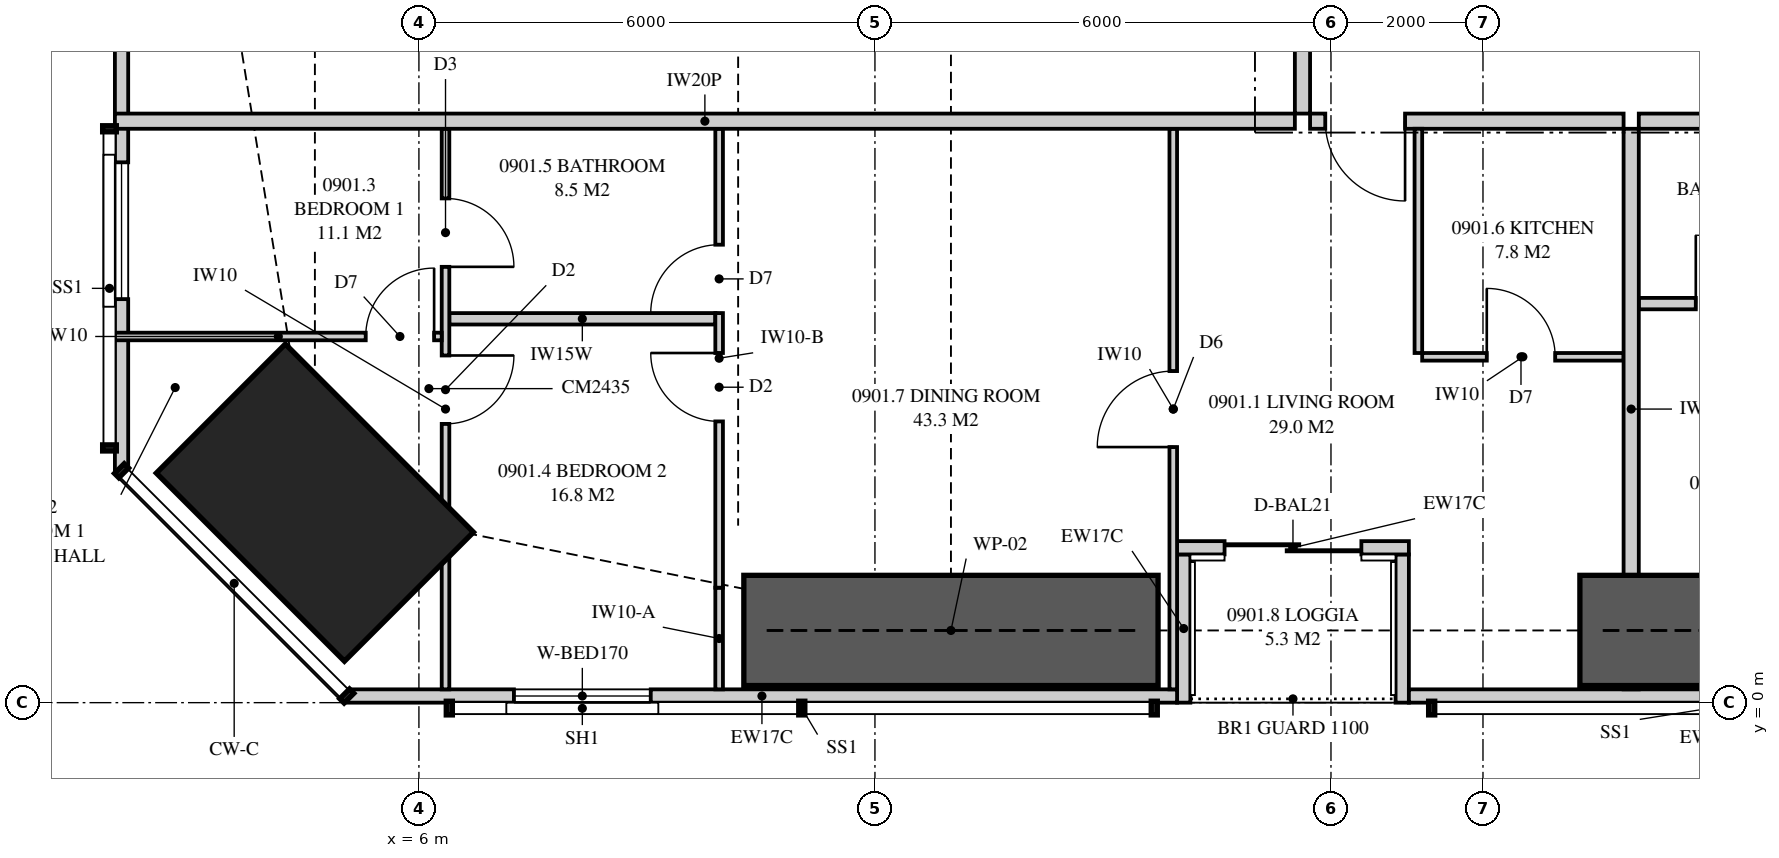
"""IFC4 building model, lengths in metres.
Left out: names, types, materials, properties, quantities, classifications, styles, units other than length and angle.
Written with IfcOpenShell. Run it as: python <this file> out.ifc"""

import sys

from ifc_helpers import new_model, si_unit, direction, frame, frame_2d, origin, origin_2d, place, context, subcontext, project, spatial, polyline, rectangle, outline, extrude, element, fill, save


model = new_model("IFC4")
c1 = context("Model", 3, precision=1e-05, world=origin(), true_north=direction((0.0, 1.0)))
c2 = subcontext(c1, "Body", "Model", "MODEL_VIEW")
j1 = project(units=[si_unit("LENGTHUNIT", "METRE"), si_unit("PLANEANGLEUNIT", "RADIAN")], contexts=[c1])
p1 = place(None, origin())
s1 = spatial("IfcSite", under=j1, at=p1, CompositionType="ELEMENT")
p2 = place(p1, origin())
s2 = spatial("IfcBuilding", under=s1, at=p2, CompositionType="ELEMENT")
p3 = place(p2, frame((0.0, 0.0, 37.75)))
s3 = spatial("IfcBuildingStorey", under=s2, at=p3, CompositionType="ELEMENT", Elevation=37.75)
p4 = place(p3, frame((4.631, 2.631, 0.0), z_axis=(0.0, 0.0, 1.0), x_axis=(0.707106781187, 0.707106781187, 0.0)))
e1 = element("IfcColumn", 1, at=p4, inside=s3, PredefinedType="COLUMN", context=c2, shape_type="SweptSolid", body=[
    extrude(rectangle(XDim=2.4, YDim=3.5, at=origin_2d()), origin(), (0.0, 0.0, 1.0), 3.35),
])
p5 = place(p3, frame((5.051, 0.087, 0.0), z_axis=(0.0, 0.0, 1.0), x_axis=(1.0, 0.0, 0.0)))
e2 = element("IfcWall", 2, at=p5, inside=s3, PredefinedType="SOLIDWALL", context=c2, shape_type="SweptSolid", body=[
    extrude(outline(polyline([(0.0, 0.0), (10.924, 0.0), (10.924, 2.15), (7.949, 2.15), (7.949, 3.11), (7.793, 3.11), (7.793, 2.15), (7.745, 2.15), (7.745, 3.11), (0.0, 3.11), (0.0, 0.0)])), frame((0.0, 0.087, 0.0), z_axis=(0.0, -1.0, 0.0), x_axis=(1.0, 0.0, 0.0)), (0.0, 0.0, 1.0), 0.175),
])
p6 = place(p5, frame((2.199, 0.0, 0.4)))
e3 = element("IfcOpeningElement", 3, at=p6, cuts=e2, PredefinedType="OPENING", context=c2, shape_type="SweptSolid", body=[
    extrude(rectangle(XDim=1.8, YDim=1.7, at=frame_2d((0.9, 0.85))), frame((0.0, 0.097, 0.0), z_axis=(0.0, -1.0, 0.0), x_axis=(1.0, 0.0, 0.0)), (0.0, 0.0, 1.0), 0.195),
])
p7 = place(p3, frame((19.025, 0.087, 0.0), z_axis=(0.0, 0.0, 1.0), x_axis=(1.0, 0.0, 0.0)))
e4 = element("IfcWall", 4, at=p7, inside=s3, PredefinedType="SOLIDWALL", context=c2, shape_type="SweptSolid", body=[
    extrude(rectangle(XDim=7.95, YDim=0.175, at=frame_2d((3.975, 0.0))), origin(), (0.0, 0.0, 1.0), 2.15),
])
p8 = place(p3, frame((15.975, 2.038, 0.0), z_axis=(0.0, 0.0, 1.0), x_axis=(1.0, 0.0, 0.0)))
e5 = element("IfcWall", 5, at=p8, inside=s3, PredefinedType="SOLIDWALL", context=c2, shape_type="SweptSolid", body=[
    extrude(rectangle(XDim=3.05, YDim=0.175, at=frame_2d((1.525, 0.0))), origin(), (0.0, 0.0, 1.0), 3.11),
])
p9 = place(p8, frame((0.625, 0.0, 0.0)))
e6 = element("IfcOpeningElement", 6, at=p9, cuts=e5, PredefinedType="OPENING", context=c2, shape_type="SweptSolid", body=[
    extrude(rectangle(XDim=1.8, YDim=2.1, at=frame_2d((0.9, 1.05))), frame((0.0, 0.097, 0.0), z_axis=(0.0, -1.0, 0.0), x_axis=(1.0, 0.0, 0.0)), (0.0, 0.0, 1.0), 0.195),
])
for number, where, z_axis, x_axis in (
    (7, (16.062, 0.0, 0.0), (0.0, 0.0, 1.0), (0.0, 1.0, 0.0)),
    (8, (18.938, 0.0, 0.0), (0.0, 0.0, 1.0), (0.0, 1.0, 0.0)),
):
    element("IfcWall", number, at=place(p3, frame(where, z_axis=z_axis, x_axis=x_axis)), inside=s3, PredefinedType="SOLIDWALL", context=c2, shape_type="SweptSolid", body=[
        extrude(outline(polyline([(0.0, 0.0), (1.95, 0.0), (1.95, 3.11), (1.75, 3.11), (1.75, 2.15), (0.15, 2.15), (0.15, 3.11), (0.0, 3.11), (0.0, 0.0)])), frame((0.0, 0.087, 0.0), z_axis=(0.0, -1.0, 0.0), x_axis=(1.0, 0.0, 0.0)), (0.0, 0.0, 1.0), 0.175),
    ])
p10 = place(p3, frame((2.087, 15.8, 0.0), z_axis=(0.0, 0.0, 1.0), x_axis=(0.0, -1.0, 0.0)))
e9 = element("IfcWall", 9, at=p10, inside=s3, PredefinedType="SOLIDWALL", context=c2, shape_type="SweptSolid", body=[
    extrude(outline(polyline([(0.0, 0.0), (12.749, 0.0), (12.749, 3.11), (3.019, 3.11), (3.019, 2.15), (2.926, 2.15), (2.926, 3.11), (2.8, 3.11), (2.8, 2.15), (0.0, 2.15), (0.0, 0.0)])), frame((0.0, 0.087, 0.0), z_axis=(0.0, -1.0, 0.0), x_axis=(1.0, 0.0, 0.0)), (0.0, 0.0, 1.0), 0.175),
])
p11 = place(p10, frame((5.65, 0.0, 0.4)))
e10 = element("IfcOpeningElement", 10, at=p11, cuts=e9, PredefinedType="OPENING", context=c2, shape_type="SweptSolid", body=[
    extrude(rectangle(XDim=1.2, YDim=1.7, at=frame_2d((0.6, 0.85))), frame((0.0, 0.097, 0.0), z_axis=(0.0, -1.0, 0.0), x_axis=(1.0, 0.0, 0.0)), (0.0, 0.0, 1.0), 0.195),
])
p12 = place(p10, frame((8.691, 0.0, 0.4)))
e11 = element("IfcOpeningElement", 11, at=p12, cuts=e9, PredefinedType="OPENING", context=c2, shape_type="SweptSolid", body=[
    extrude(rectangle(XDim=1.8, YDim=1.7, at=frame_2d((0.9, 0.85))), frame((0.0, 0.097, 0.0), z_axis=(0.0, -1.0, 0.0), x_axis=(1.0, 0.0, 0.0)), (0.0, 0.0, 1.0), 0.195),
])
p13 = place(p3, frame((21.95, 0.175, 0.0), z_axis=(0.0, 0.0, 1.0), x_axis=(0.0, 1.0, 0.0)))
e12 = element("IfcWall", 12, at=p13, inside=s3, PredefinedType="PARTITIONING", context=c2, shape_type="SweptSolid", body=[
    extrude(outline(polyline([(0.529, 2.15), (0.0, 2.15), (0.0, 0.0), (0.529, 0.0), (0.529, 0.09), (1.021, 0.09), (1.021, 0.0), (7.375, 0.0), (7.375, 3.11), (1.685, 3.11), (1.685, 2.15), (1.021, 2.15), (1.021, 2.06), (0.529, 2.06), (0.529, 2.15)])), frame((0.0, 0.1, 0.0), z_axis=(0.0, -1.0, 0.0), x_axis=(1.0, 0.0, 0.0)), (0.0, 0.0, 1.0), 0.2),
])
p14 = place(p3, frame((17.725, 7.65, 0.0), z_axis=(0.0, 0.0, 1.0), x_axis=(1.0, 0.0, 0.0)))
e13 = element("IfcWall", 13, at=p14, inside=s3, PredefinedType="PARTITIONING", context=c2, shape_type="SweptSolid", body=[
    extrude(rectangle(XDim=4.125, YDim=0.2, at=frame_2d((2.062, 0.0))), origin(), (0.0, 0.0, 1.0), 3.11),
])
p15 = place(p14, frame((0.2, 0.0, 0.0)))
e14 = element("IfcOpeningElement", 14, at=p15, cuts=e13, PredefinedType="OPENING", context=c2, shape_type="SweptSolid", body=[
    extrude(rectangle(XDim=1.05, YDim=2.2, at=frame_2d((0.525, 1.1))), frame((0.0, 0.11, 0.0), z_axis=(0.0, -1.0, 0.0), x_axis=(1.0, 0.0, 0.0)), (0.0, 0.0, 1.0), 0.22),
])
p16 = place(p3, frame((6.35, 0.175, 0.0), z_axis=(0.0, 0.0, 1.0), x_axis=(0.0, 1.0, 0.0)))
e15 = element("IfcWall", 15, at=p16, inside=s3, PredefinedType="PARTITIONING", context=c2, shape_type="SweptSolid", body=[
    extrude(outline(polyline([(0.0, 0.0), (7.375, 0.0), (7.375, 3.11), (2.988, 3.11), (2.988, 2.15), (1.234, 2.15), (1.234, 3.11), (0.0, 3.11), (0.0, 0.0)])), frame((0.0, 0.05, 0.0), z_axis=(0.0, -1.0, 0.0), x_axis=(1.0, 0.0, 0.0)), (0.0, 0.0, 1.0), 0.1),
])
p17 = place(p16, frame((3.492, 0.0, 0.0)))
e16 = element("IfcOpeningElement", 16, at=p17, cuts=e15, PredefinedType="OPENING", context=c2, shape_type="SweptSolid", body=[
    extrude(rectangle(XDim=0.9, YDim=2.1, at=frame_2d((0.45, 1.05))), frame((0.0, 0.06, 0.0), z_axis=(0.0, -1.0, 0.0), x_axis=(1.0, 0.0, 0.0)), (0.0, 0.0, 1.0), 0.12),
])
p18 = place(p16, frame((5.559, 0.0, 0.0)))
e17 = element("IfcOpeningElement", 17, at=p18, cuts=e15, PredefinedType="OPENING", context=c2, shape_type="SweptSolid", body=[
    extrude(rectangle(XDim=0.9, YDim=2.1, at=frame_2d((0.45, 1.05))), frame((0.0, 0.06, 0.0), z_axis=(0.0, -1.0, 0.0), x_axis=(1.0, 0.0, 0.0)), (0.0, 0.0, 1.0), 0.12),
])
p19 = place(p3, frame((9.95, 0.175, 0.0), z_axis=(0.0, 0.0, 1.0), x_axis=(0.0, 1.0, 0.0)))
e18 = element("IfcWall", 18, at=p19, inside=s3, PredefinedType="PARTITIONING", context=c2, shape_type="SweptSolid", body=[
    extrude(outline(polyline([(0.0, 0.0), (1.338, 0.0), (1.338, 2.15), (0.51, 2.15), (0.51, 3.11), (0.0, 3.11), (0.0, 0.0)])), frame((0.0, 0.05, 0.0), z_axis=(0.0, -1.0, 0.0), x_axis=(1.0, 0.0, 0.0)), (0.0, 0.0, 1.0), 0.1),
])
p20 = place(p3, frame((9.95, 1.513, 0.0), z_axis=(0.0, 0.0, 1.0), x_axis=(0.0, 1.0, 0.0)))
e19 = element("IfcWall", 19, at=p20, inside=s3, PredefinedType="PARTITIONING", context=c2, shape_type="SweptSolid", body=[
    extrude(outline(polyline([(0.0, 0.0), (6.037, 0.0), (6.037, 2.51), (0.927, 2.51), (0.927, 2.15), (0.0, 2.15), (0.0, 0.0)])), frame((0.0, 0.05, 0.0), z_axis=(0.0, -1.0, 0.0), x_axis=(1.0, 0.0, 0.0)), (0.0, 0.0, 1.0), 0.1),
])
p21 = place(p20, frame((2.188, 0.0, 0.0)))
e20 = element("IfcOpeningElement", 20, at=p21, cuts=e19, PredefinedType="OPENING", context=c2, shape_type="SweptSolid", body=[
    extrude(rectangle(XDim=0.9, YDim=2.1, at=frame_2d((0.45, 1.05))), frame((0.0, 0.06, 0.0), z_axis=(0.0, -1.0, 0.0), x_axis=(1.0, 0.0, 0.0)), (0.0, 0.0, 1.0), 0.12),
])
p22 = place(p20, frame((3.612, 0.0, 0.0)))
e21 = element("IfcOpeningElement", 21, at=p22, cuts=e19, PredefinedType="OPENING", context=c2, shape_type="SweptSolid", body=[
    extrude(rectangle(XDim=0.9, YDim=2.1, at=frame_2d((0.45, 1.05))), frame((0.0, 0.06, 0.0), z_axis=(0.0, -1.0, 0.0), x_axis=(1.0, 0.0, 0.0)), (0.0, 0.0, 1.0), 0.12),
])
p23 = place(p3, frame((2.0, 4.817, 0.0), z_axis=(0.0, 0.0, 1.0), x_axis=(1.0, 0.0, 0.0)))
e22 = element("IfcWall", 22, at=p23, inside=s3, PredefinedType="PARTITIONING", context=c2, shape_type="SweptSolid", body=[
    extrude(outline(polyline([(0.0, 0.0), (4.3, 0.0), (4.3, 3.11), (3.148, 3.11), (3.148, 2.15), (1.406, 2.15), (1.406, 3.11), (0.0, 3.11), (0.0, 0.0)])), frame((0.0, 0.05, 0.0), z_axis=(0.0, -1.0, 0.0), x_axis=(1.0, 0.0, 0.0)), (0.0, 0.0, 1.0), 0.1),
])
p24 = place(p23, frame((3.3, 0.0, 0.0)))
e23 = element("IfcOpeningElement", 23, at=p24, cuts=e22, PredefinedType="OPENING", context=c2, shape_type="SweptSolid", body=[
    extrude(rectangle(XDim=0.9, YDim=2.1, at=frame_2d((0.45, 1.05))), frame((0.0, 0.06, 0.0), z_axis=(0.0, -1.0, 0.0), x_axis=(1.0, 0.0, 0.0)), (0.0, 0.0, 1.0), 0.12),
])
p25 = place(p3, frame((6.4, 5.05, 0.0), z_axis=(0.0, 0.0, 1.0), x_axis=(1.0, 0.0, 0.0)))
e24 = element("IfcWall", 24, at=p25, inside=s3, PredefinedType="PLUMBINGWALL", context=c2, shape_type="SweptSolid", body=[
    extrude(outline(polyline([(0.0, 0.0), (3.5, 0.0), (3.5, 3.11), (3.5, 2.51), (2.515, 2.51), (2.515, 3.11), (0.0, 3.11), (0.0, 0.0)])), frame((0.0, 0.075, 0.0), z_axis=(0.0, -1.0, 0.0), x_axis=(1.0, 0.0, 0.0)), (0.0, 0.0, 1.0), 0.15),
])
p26 = place(p3, frame((19.2, 4.55, 0.0), z_axis=(0.0, 0.0, 1.0), x_axis=(1.0, 0.0, 0.0)))
e25 = element("IfcWall", 25, at=p26, inside=s3, PredefinedType="PARTITIONING", context=c2, shape_type="SweptSolid", body=[
    extrude(rectangle(XDim=2.65, YDim=0.1, at=frame_2d((1.325, 0.0))), origin(), (0.0, 0.0, 1.0), 3.11),
])
p27 = place(p26, frame((0.85, 0.0, 0.0)))
e26 = element("IfcOpeningElement", 26, at=p27, cuts=e25, PredefinedType="OPENING", context=c2, shape_type="SweptSolid", body=[
    extrude(rectangle(XDim=0.9, YDim=2.1, at=frame_2d((0.45, 1.05))), frame((0.0, 0.06, 0.0), z_axis=(0.0, -1.0, 0.0), x_axis=(1.0, 0.0, 0.0)), (0.0, 0.0, 1.0), 0.12),
])
p28 = place(p3, frame((19.15, 4.6, 0.0), z_axis=(0.0, 0.0, 1.0), x_axis=(0.0, 1.0, 0.0)))
e27 = element("IfcWall", 27, at=p28, inside=s3, PredefinedType="PARTITIONING", context=c2, shape_type="SweptSolid", body=[
    extrude(rectangle(XDim=2.95, YDim=0.1, at=frame_2d((1.475, 0.0))), origin(), (0.0, 0.0, 1.0), 3.11),
])
p29 = place(p3, frame((15.925, 0.175, 0.0), z_axis=(0.0, 0.0, 1.0), x_axis=(0.0, 1.0, 0.0)))
e28 = element("IfcWall", 28, at=p29, inside=s3, PredefinedType="PARTITIONING", context=c2, shape_type="SweptSolid", body=[
    extrude(outline(polyline([(0.0, 0.0), (7.375, 0.0), (7.375, 3.11), (1.635, 3.11), (1.635, 2.15), (0.0, 2.15), (0.0, 3.11), (0.0, 0.0)])), frame((0.0, 0.05, 0.0), z_axis=(0.0, -1.0, 0.0), x_axis=(1.0, 0.0, 0.0)), (0.0, 0.0, 1.0), 0.1),
])
p30 = place(p29, frame((3.188, 0.0, 0.0)))
e29 = element("IfcOpeningElement", 29, at=p30, cuts=e28, PredefinedType="OPENING", context=c2, shape_type="SweptSolid", body=[
    extrude(rectangle(XDim=1.0, YDim=2.1, at=frame_2d((0.5, 1.05))), frame((0.0, 0.06, 0.0), z_axis=(0.0, -1.0, 0.0), x_axis=(1.0, 0.0, 0.0)), (0.0, 0.0, 1.0), 0.12),
])
p31 = place(p3, frame((22.05, 7.65, 0.0), z_axis=(0.0, 0.0, 1.0), x_axis=(1.0, 0.0, 0.0)))
e30 = element("IfcWall", 30, at=p31, inside=s3, PredefinedType="PARTITIONING", context=c2, shape_type="SweptSolid", body=[
    extrude(outline(polyline([(0.0, 0.0), (5.825, 0.0), (5.825, 3.11), (2.287, 3.11), (2.287, 2.541), (1.613, 2.541), (1.613, 3.11), (0.0, 3.11), (0.0, 0.0)])), frame((0.0, 0.1, 0.0), z_axis=(0.0, -1.0, 0.0), x_axis=(1.0, 0.0, 0.0)), (0.0, 0.0, 1.0), 0.2),
])
p32 = place(p3, frame((22.05, 5.25, 0.0), z_axis=(0.0, 0.0, 1.0), x_axis=(1.0, 0.0, 0.0)))
e31 = element("IfcWall", 31, at=p32, inside=s3, PredefinedType="PLUMBINGWALL", context=c2, shape_type="SweptSolid", body=[
    extrude(outline(polyline([(0.0, 0.0), (2.425, 0.0), (2.425, 3.11), (2.262, 3.11), (2.262, 2.541), (1.638, 2.541), (1.638, 3.11), (0.0, 3.11), (0.0, 0.0)])), frame((0.0, 0.075, 0.0), z_axis=(0.0, -1.0, 0.0), x_axis=(1.0, 0.0, 0.0)), (0.0, 0.0, 1.0), 0.15),
])
p33 = place(p32, frame((0.75, 0.0, 0.0)))
e32 = element("IfcOpeningElement", 32, at=p33, cuts=e31, PredefinedType="OPENING", context=c2, shape_type="SweptSolid", body=[
    extrude(rectangle(XDim=0.9, YDim=2.1, at=frame_2d((0.45, 1.05))), frame((0.0, 0.085, 0.0), z_axis=(0.0, -1.0, 0.0), x_axis=(1.0, 0.0, 0.0)), (0.0, 0.0, 1.0), 0.17),
])
p34 = place(p3, frame((2.0, 7.65, 0.0), z_axis=(0.0, 0.0, 1.0), x_axis=(1.0, 0.0, 0.0)))
e33 = element("IfcWall", 33, at=p34, inside=s3, PredefinedType="PARTITIONING", context=c2, shape_type="SweptSolid", body=[
    extrude(outline(polyline([(0.0, 0.0), (15.525, 0.0), (15.525, 3.11), (11.337, 3.11), (11.337, 2.541), (10.663, 2.541), (10.663, 3.11), (9.51, 3.11), (9.51, 2.51), (6.89, 2.51), (6.89, 3.11), (2.969, 3.11), (2.969, 2.541), (2.74, 2.541), (2.74, 2.15), (0.896, 2.15), (0.896, 3.11), (0.0, 3.11), (0.0, 0.0)])), frame((0.0, 0.1, 0.0), z_axis=(0.0, -1.0, 0.0), x_axis=(1.0, 0.0, 0.0)), (0.0, 0.0, 1.0), 0.2),
])
p35 = place(p3, frame((17.625, 7.75, 0.0), z_axis=(0.0, 0.0, 1.0), x_axis=(0.0, 1.0, 0.0)))
e34 = element("IfcWall", 34, at=p35, inside=s3, PredefinedType="PARTITIONING", context=c2, shape_type="SweptSolid", body=[
    extrude(outline(polyline([(0.0, 0.0), (6.15, 0.0), (6.15, 3.11), (5.587, 3.11), (5.587, 2.541), (4.913, 2.541), (4.913, 3.11), (0.0, 3.11), (0.0, 0.0)])), frame((0.0, 0.1, 0.0), z_axis=(0.0, -1.0, 0.0), x_axis=(1.0, 0.0, 0.0)), (0.0, 0.0, 1.0), 0.2),
])
p36 = place(p35, frame((2.175, 0.0, 0.0)))
e35 = element("IfcOpeningElement", 35, at=p36, cuts=e34, PredefinedType="OPENING", context=c2, shape_type="SweptSolid", body=[
    extrude(rectangle(XDim=1.8, YDim=2.1, at=frame_2d((0.9, 1.05))), frame((0.0, 0.11, 0.0), z_axis=(0.0, -1.0, 0.0), x_axis=(1.0, 0.0, 0.0)), (0.0, 0.0, 1.0), 0.22),
])
for number, where, z_axis, x_axis in (
    (36, (10.275, 0.95, 0.0), (0.0, 0.0, 1.0), (1.0, 0.0, 0.0)),
    (37, (21.275, 0.95, 0.0), (0.0, 0.0, 1.0), (1.0, 0.0, 0.0)),
):
    element("IfcWall", number, at=place(p3, frame(where, z_axis=z_axis, x_axis=x_axis)), inside=s3, PredefinedType="SHEAR", context=c2, shape_type="SweptSolid", body=[
        extrude(rectangle(XDim=5.45, YDim=1.45, at=frame_2d((2.725, 0.0))), origin(), (0.0, 0.0, 1.0), 3.35),
    ])
p37 = place(p6, origin())
e38 = element("IfcWindow", 38, at=p37, inside=s3, PartitioningType="SINGLE_PANEL", PredefinedType="WINDOW", context=c2, shape_type="SweptSolid", body=[
    extrude(rectangle(XDim=1.8, YDim=1.7, at=frame_2d((0.9, 0.85))), frame((0.0, 0.03, 0.0), z_axis=(0.0, -1.0, 0.0), x_axis=(1.0, 0.0, 0.0)), (0.0, 0.0, 1.0), 0.06),
])
fill(e3, e38)
p38 = place(p9, origin())
e39 = element("IfcDoor", 39, at=p38, inside=s3, OperationType="SLIDING_TO_LEFT", PredefinedType="DOOR", context=c2, shape_type="SweptSolid", body=[
    extrude(rectangle(XDim=1.8, YDim=2.1, at=frame_2d((0.9, 1.05))), frame((0.0, 0.025, 0.0), z_axis=(0.0, -1.0, 0.0), x_axis=(1.0, 0.0, 0.0)), (0.0, 0.0, 1.0), 0.05),
])
fill(e6, e39)
p39 = place(p12, origin())
e40 = element("IfcWindow", 40, at=p39, inside=s3, PartitioningType="SINGLE_PANEL", PredefinedType="WINDOW", context=c2, shape_type="SweptSolid", body=[
    extrude(rectangle(XDim=1.8, YDim=1.7, at=frame_2d((0.9, 0.85))), frame((0.0, 0.03, 0.0), z_axis=(0.0, -1.0, 0.0), x_axis=(1.0, 0.0, 0.0)), (0.0, 0.0, 1.0), 0.06),
])
fill(e11, e40)
p40 = place(p15, frame((1.05, 0.0, 0.0), z_axis=(0.0, 0.0, 1.0), x_axis=(-1.0, 0.0, 0.0)))
e41 = element("IfcDoor", 41, at=p40, inside=s3, OperationType="SINGLE_SWING_LEFT", PredefinedType="DOOR", context=c2, shape_type="SweptSolid", body=[
    extrude(rectangle(XDim=1.05, YDim=2.2, at=frame_2d((0.525, 1.1))), frame((0.0, 0.025, 0.0), z_axis=(0.0, -1.0, 0.0), x_axis=(1.0, 0.0, 0.0)), (0.0, 0.0, 1.0), 0.05),
])
fill(e14, e41)
p41 = place(p24, origin())
e42 = element("IfcDoor", 42, at=p41, inside=s3, OperationType="SINGLE_SWING_RIGHT", PredefinedType="DOOR", context=c2, shape_type="SweptSolid", body=[
    extrude(rectangle(XDim=0.9, YDim=2.1, at=frame_2d((0.45, 1.05))), frame((0.0, 0.025, 0.0), z_axis=(0.0, -1.0, 0.0), x_axis=(1.0, 0.0, 0.0)), (0.0, 0.0, 1.0), 0.05),
])
fill(e23, e42)
p42 = place(p17, frame((0.9, 0.0, 0.0), z_axis=(0.0, 0.0, 1.0), x_axis=(-1.0, 0.0, 0.0)))
e43 = element("IfcDoor", 43, at=p42, inside=s3, OperationType="SINGLE_SWING_LEFT", PredefinedType="DOOR", context=c2, shape_type="SweptSolid", body=[
    extrude(rectangle(XDim=0.9, YDim=2.1, at=frame_2d((0.45, 1.05))), frame((0.0, 0.025, 0.0), z_axis=(0.0, -1.0, 0.0), x_axis=(1.0, 0.0, 0.0)), (0.0, 0.0, 1.0), 0.05),
])
fill(e16, e43)
p43 = place(p21, origin())
e44 = element("IfcDoor", 44, at=p43, inside=s3, OperationType="SINGLE_SWING_RIGHT", PredefinedType="DOOR", context=c2, shape_type="SweptSolid", body=[
    extrude(rectangle(XDim=0.9, YDim=2.1, at=frame_2d((0.45, 1.05))), frame((0.0, 0.025, 0.0), z_axis=(0.0, -1.0, 0.0), x_axis=(1.0, 0.0, 0.0)), (0.0, 0.0, 1.0), 0.05),
])
fill(e20, e44)
p44 = place(p22, origin())
e45 = element("IfcDoor", 45, at=p44, inside=s3, OperationType="SINGLE_SWING_LEFT", PredefinedType="DOOR", context=c2, shape_type="SweptSolid", body=[
    extrude(rectangle(XDim=0.9, YDim=2.1, at=frame_2d((0.45, 1.05))), frame((0.0, 0.025, 0.0), z_axis=(0.0, -1.0, 0.0), x_axis=(1.0, 0.0, 0.0)), (0.0, 0.0, 1.0), 0.05),
])
fill(e21, e45)
p45 = place(p18, frame((0.9, 0.0, 0.0), z_axis=(0.0, 0.0, 1.0), x_axis=(-1.0, 0.0, 0.0)))
e46 = element("IfcDoor", 46, at=p45, inside=s3, OperationType="SINGLE_SWING_RIGHT", PredefinedType="DOOR", context=c2, shape_type="SweptSolid", body=[
    extrude(rectangle(XDim=0.9, YDim=2.1, at=frame_2d((0.45, 1.05))), frame((0.0, 0.025, 0.0), z_axis=(0.0, -1.0, 0.0), x_axis=(1.0, 0.0, 0.0)), (0.0, 0.0, 1.0), 0.05),
])
fill(e17, e46)
p46 = place(p27, origin())
e47 = element("IfcDoor", 47, at=p46, inside=s3, OperationType="SINGLE_SWING_LEFT", PredefinedType="DOOR", context=c2, shape_type="SweptSolid", body=[
    extrude(rectangle(XDim=0.9, YDim=2.1, at=frame_2d((0.45, 1.05))), frame((0.0, 0.025, 0.0), z_axis=(0.0, -1.0, 0.0), x_axis=(1.0, 0.0, 0.0)), (0.0, 0.0, 1.0), 0.05),
])
fill(e26, e47)
p47 = place(p30, origin())
e48 = element("IfcDoor", 48, at=p47, inside=s3, OperationType="SINGLE_SWING_LEFT", PredefinedType="DOOR", context=c2, shape_type="SweptSolid", body=[
    extrude(rectangle(XDim=1.0, YDim=2.1, at=frame_2d((0.5, 1.05))), frame((0.0, 0.025, 0.0), z_axis=(0.0, -1.0, 0.0), x_axis=(1.0, 0.0, 0.0)), (0.0, 0.0, 1.0), 0.05),
])
fill(e29, e48)
p48 = place(p33, origin())
e49 = element("IfcDoor", 49, at=p48, inside=s3, OperationType="SINGLE_SWING_LEFT", PredefinedType="DOOR", context=c2, shape_type="SweptSolid", body=[
    extrude(rectangle(XDim=0.9, YDim=2.1, at=frame_2d((0.45, 1.05))), frame((0.0, 0.025, 0.0), z_axis=(0.0, -1.0, 0.0), x_axis=(1.0, 0.0, 0.0)), (0.0, 0.0, 1.0), 0.05),
])
fill(e32, e49)
save(model, sys.argv[1])
